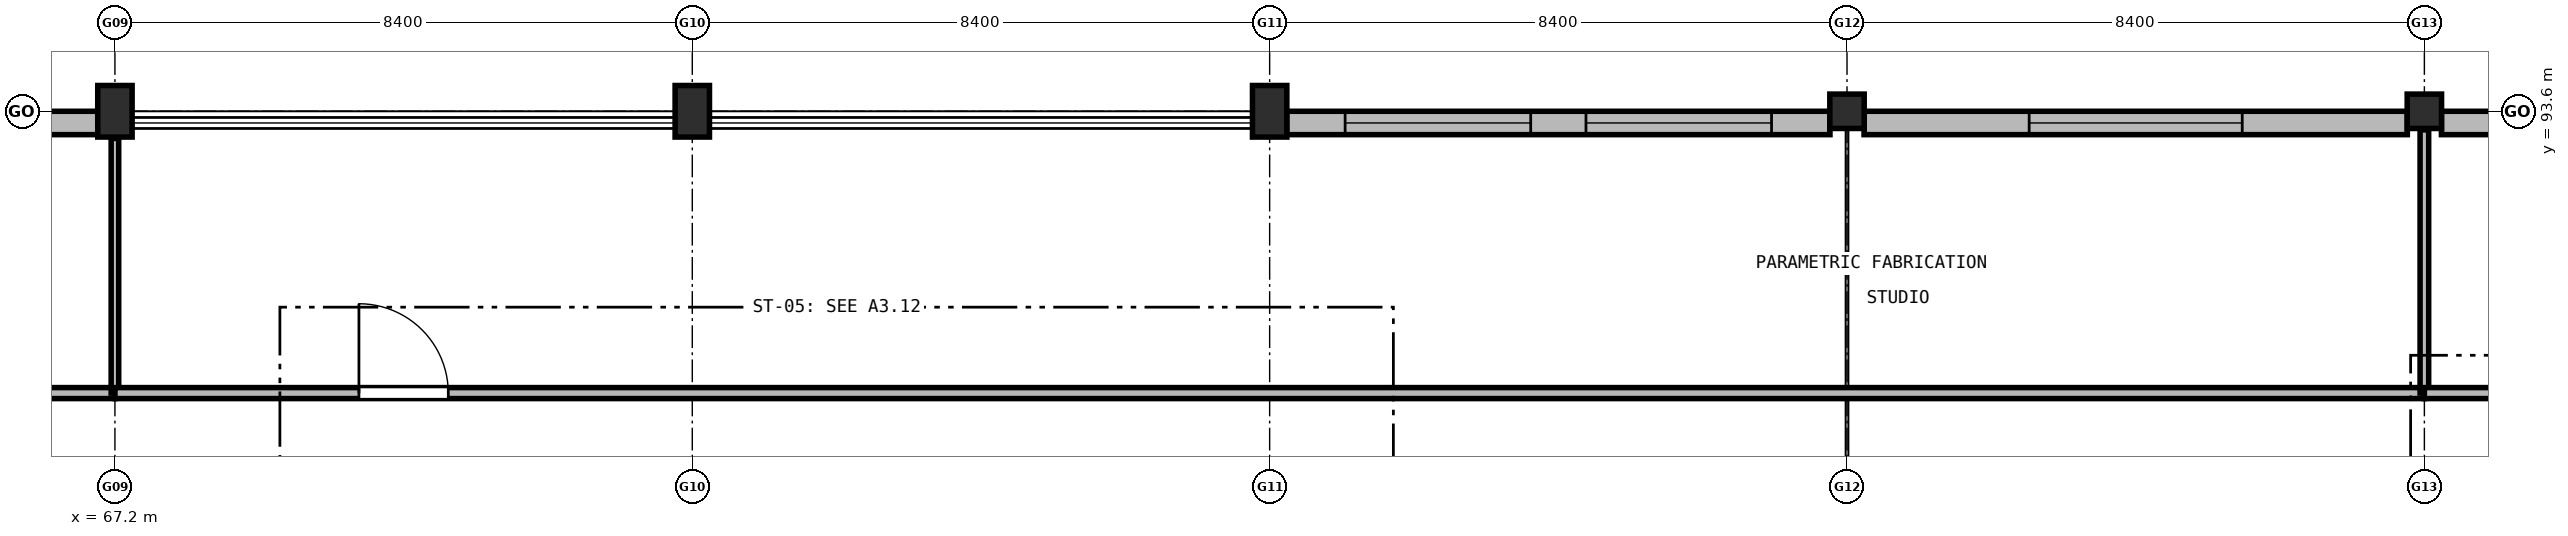
"""IFC4 building model, lengths in metres.
Left out: names, types, materials, properties, quantities, classifications, styles, units other than length and angle.
Written with IfcOpenShell. Run it as: python <this file> out.ifc"""

import sys

from ifc_helpers import new_model, si_unit, direction, frame, frame_2d, origin, origin_2d, place, context, subcontext, project, spatial, rectangle, extrude, element, fill, save


model = new_model("IFC4")
c1 = context("Model", 3, precision=1e-05, world=origin(), true_north=direction((0.0, 1.0)))
c2 = subcontext(c1, "Body", "Model", "MODEL_VIEW")
j1 = project(units=[si_unit("LENGTHUNIT", "METRE"), si_unit("PLANEANGLEUNIT", "RADIAN")], contexts=[c1])
p1 = place(None, origin())
s1 = spatial("IfcSite", under=j1, at=p1, CompositionType="ELEMENT")
p2 = place(p1, origin())
s2 = spatial("IfcBuilding", under=s1, at=p2, CompositionType="ELEMENT")
p3 = place(p2, frame((0.0, 0.0, 9.3)))
s3 = spatial("IfcBuildingStorey", under=s2, at=p3, CompositionType="ELEMENT", Elevation=9.3)
for number, where, z_axis, x_axis in (
    (1, (67.2, 93.6, 0.0), (0.0, 0.0, 1.0), (1.0, 0.0, 0.0)),
    (2, (75.6, 93.6, 0.0), (0.0, 0.0, 1.0), (1.0, 0.0, 0.0)),
    (3, (84.0, 93.6, 0.0), (0.0, 0.0, 1.0), (1.0, 0.0, 0.0)),
):
    element("IfcColumn", number, at=place(p3, frame(where, z_axis=z_axis, x_axis=x_axis)), inside=s3, PredefinedType="COLUMN", context=c2, shape_type="SweptSolid", body=[
        extrude(rectangle(XDim=0.5, YDim=0.75, at=origin_2d()), origin(), (0.0, 0.0, 1.0), 4.2),
    ])
for number, where, z_axis, x_axis in (
    (4, (92.4, 93.6, 0.0), (0.0, 0.0, 1.0), (1.0, 0.0, 0.0)),
    (5, (100.8, 93.6, 0.0), (0.0, 0.0, 1.0), (1.0, 0.0, 0.0)),
):
    element("IfcColumn", number, at=place(p3, frame(where, z_axis=z_axis, x_axis=x_axis)), inside=s3, PredefinedType="COLUMN", context=c2, shape_type="SweptSolid", body=[
        extrude(rectangle(XDim=0.5, YDim=0.5, at=origin_2d()), origin(), (0.0, 0.0, 1.0), 4.2),
    ])
p4 = place(p3, frame((59.048, 93.43, 0.0), z_axis=(0.0, 0.0, 1.0), x_axis=(1.0, 0.0, 0.0)))
e6 = element("IfcWall", 6, at=p4, inside=s3, PredefinedType="SOLIDWALL", context=c2, shape_type="SweptSolid", body=[
    extrude(rectangle(XDim=7.904, YDim=0.34, at=frame_2d((3.952, 0.0))), origin(), (0.0, 0.0, 1.0), 3.18),
])
p5 = place(p4, frame((1.501, 0.0, 0.95)))
e7 = element("IfcOpeningElement", 7, at=p5, cuts=e6, PredefinedType="OPENING", context=c2, shape_type="SweptSolid", body=[
    extrude(rectangle(XDim=1.7, YDim=1.65, at=frame_2d((0.85, 0.825))), frame((0.0, 0.18, 0.0), z_axis=(0.0, -1.0, 0.0), x_axis=(1.0, 0.0, 0.0)), (0.0, 0.0, 1.0), 0.36),
])
p6 = place(p4, frame((4.703, 0.0, 0.95)))
e8 = element("IfcOpeningElement", 8, at=p6, cuts=e6, PredefinedType="OPENING", context=c2, shape_type="SweptSolid", body=[
    extrude(rectangle(XDim=1.7, YDim=1.65, at=frame_2d((0.85, 0.825))), frame((0.0, 0.18, 0.0), z_axis=(0.0, -1.0, 0.0), x_axis=(1.0, 0.0, 0.0)), (0.0, 0.0, 1.0), 0.36),
])
p7 = place(p3, frame((84.248, 93.43, 0.0), z_axis=(0.0, 0.0, 1.0), x_axis=(1.0, 0.0, 0.0)))
e9 = element("IfcWall", 9, at=p7, inside=s3, PredefinedType="SOLIDWALL", context=c2, shape_type="SweptSolid", body=[
    extrude(rectangle(XDim=7.904, YDim=0.34, at=frame_2d((3.952, 0.0))), origin(), (0.0, 0.0, 1.0), 3.18),
])
p8 = place(p7, frame((0.85, 0.0, 0.95)))
e10 = element("IfcOpeningElement", 10, at=p8, cuts=e9, PredefinedType="OPENING", context=c2, shape_type="SweptSolid", body=[
    extrude(rectangle(XDim=2.7, YDim=1.9, at=frame_2d((1.35, 0.95))), frame((0.0, 0.18, 0.0), z_axis=(0.0, -1.0, 0.0), x_axis=(1.0, 0.0, 0.0)), (0.0, 0.0, 1.0), 0.36),
])
p9 = place(p7, frame((4.354, 0.0, 0.95)))
e11 = element("IfcOpeningElement", 11, at=p9, cuts=e9, PredefinedType="OPENING", context=c2, shape_type="SweptSolid", body=[
    extrude(rectangle(XDim=2.7, YDim=1.9, at=frame_2d((1.35, 0.95))), frame((0.0, 0.18, 0.0), z_axis=(0.0, -1.0, 0.0), x_axis=(1.0, 0.0, 0.0)), (0.0, 0.0, 1.0), 0.36),
])
p10 = place(p3, frame((92.648, 93.43, 0.0), z_axis=(0.0, 0.0, 1.0), x_axis=(1.0, 0.0, 0.0)))
e12 = element("IfcWall", 12, at=p10, inside=s3, PredefinedType="SOLIDWALL", context=c2, shape_type="SweptSolid", body=[
    extrude(rectangle(XDim=7.904, YDim=0.34, at=frame_2d((3.952, 0.0))), origin(), (0.0, 0.0, 1.0), 3.18),
])
p11 = place(p10, frame((2.402, 0.0, 0.95)))
e13 = element("IfcOpeningElement", 13, at=p11, cuts=e12, PredefinedType="OPENING", context=c2, shape_type="SweptSolid", body=[
    extrude(rectangle(XDim=3.1, YDim=1.95, at=frame_2d((1.55, 0.975))), frame((0.0, 0.18, 0.0), z_axis=(0.0, -1.0, 0.0), x_axis=(1.0, 0.0, 0.0)), (0.0, 0.0, 1.0), 0.36),
])
p12 = place(p3, frame((101.048, 93.43, 0.0), z_axis=(0.0, 0.0, 1.0), x_axis=(1.0, 0.0, 0.0)))
e14 = element("IfcWall", 14, at=p12, inside=s3, PredefinedType="SOLIDWALL", context=c2, shape_type="SweptSolid", body=[
    extrude(rectangle(XDim=7.904, YDim=0.34, at=frame_2d((3.952, 0.0))), origin(), (0.0, 0.0, 1.0), 3.18),
])
p13 = place(p12, frame((2.302, 0.0, 0.95)))
e15 = element("IfcOpeningElement", 15, at=p13, cuts=e14, PredefinedType="OPENING", context=c2, shape_type="SweptSolid", body=[
    extrude(rectangle(XDim=3.3, YDim=1.65, at=frame_2d((1.65, 0.825))), frame((0.0, 0.18, 0.0), z_axis=(0.0, -1.0, 0.0), x_axis=(1.0, 0.0, 0.0)), (0.0, 0.0, 1.0), 0.36),
])
p14 = place(p3, frame((33.6, 89.5, 0.0), z_axis=(0.0, 0.0, 1.0), x_axis=(1.0, 0.0, 0.0)))
e16 = element("IfcWall", 16, at=p14, inside=s3, PredefinedType="PARTITIONING", context=c2, shape_type="SweptSolid", body=[
    extrude(rectangle(XDim=33.6, YDim=0.16, at=frame_2d((16.8, 0.0))), origin(), (0.0, 0.0, 1.0), 3.325),
])
p15 = place(p14, frame((3.375, 0.0, 0.0)))
e17 = element("IfcOpeningElement", 17, at=p15, cuts=e16, PredefinedType="OPENING", context=c2, shape_type="SweptSolid", body=[
    extrude(rectangle(XDim=1.65, YDim=2.2, at=frame_2d((0.825, 1.1))), frame((0.0, 0.09, 0.0), z_axis=(0.0, -1.0, 0.0), x_axis=(1.0, 0.0, 0.0)), (0.0, 0.0, 1.0), 0.18),
])
p16 = place(p3, frame((67.2, 89.5, 0.0), z_axis=(0.0, 0.0, 1.0), x_axis=(0.0, 1.0, 0.0)))
e18 = element("IfcWall", 18, at=p16, inside=s3, PredefinedType="PARTITIONING", context=c2, shape_type="SweptSolid", body=[
    extrude(rectangle(XDim=3.705, YDim=0.11, at=frame_2d((1.853, 0.0))), origin(), (0.0, 0.0, 1.0), 3.175),
])
p17 = place(p3, frame((67.2, 89.5, 0.0), z_axis=(0.0, 0.0, 1.0), x_axis=(1.0, 0.0, 0.0)))
e19 = element("IfcWall", 19, at=p17, inside=s3, PredefinedType="PARTITIONING", context=c2, shape_type="SweptSolid", body=[
    extrude(rectangle(XDim=33.6, YDim=0.16, at=frame_2d((16.8, 0.0))), origin(), (0.0, 0.0, 1.0), 3.325),
])
p18 = place(p17, frame((3.55, 0.0, 0.0)))
e20 = element("IfcOpeningElement", 20, at=p18, cuts=e19, PredefinedType="OPENING", context=c2, shape_type="SweptSolid", body=[
    extrude(rectangle(XDim=1.3, YDim=2.15, at=frame_2d((0.65, 1.075))), frame((0.0, 0.09, 0.0), z_axis=(0.0, -1.0, 0.0), x_axis=(1.0, 0.0, 0.0)), (0.0, 0.0, 1.0), 0.18),
])
p19 = place(p3, frame((100.8, 89.5, 0.0), z_axis=(0.0, 0.0, 1.0), x_axis=(0.0, 1.0, 0.0)))
e21 = element("IfcWall", 21, at=p19, inside=s3, PredefinedType="PARTITIONING", context=c2, shape_type="SweptSolid", body=[
    extrude(rectangle(XDim=3.83, YDim=0.125, at=frame_2d((1.915, 0.0))), origin(), (0.0, 0.0, 1.0), 3.175),
])
p20 = place(p3, frame((100.8, 89.5, 0.0), z_axis=(0.0, 0.0, 1.0), x_axis=(1.0, 0.0, 0.0)))
e22 = element("IfcWall", 22, at=p20, inside=s3, PredefinedType="PARTITIONING", context=c2, shape_type="SweptSolid", body=[
    extrude(rectangle(XDim=33.38, YDim=0.16, at=frame_2d((16.69, 0.0))), origin(), (0.0, 0.0, 1.0), 3.325),
])
p21 = place(p20, frame((3.675, 0.0, 0.0)))
e23 = element("IfcOpeningElement", 23, at=p21, cuts=e22, PredefinedType="OPENING", context=c2, shape_type="SweptSolid", body=[
    extrude(rectangle(XDim=1.05, YDim=2.15, at=frame_2d((0.525, 1.075))), frame((0.0, 0.09, 0.0), z_axis=(0.0, -1.0, 0.0), x_axis=(1.0, 0.0, 0.0)), (0.0, 0.0, 1.0), 0.18),
])
p22 = place(p8, origin())
e24 = element("IfcWindow", 24, at=p22, inside=s3, PartitioningType="SINGLE_PANEL", PredefinedType="WINDOW", context=c2, shape_type="SweptSolid", body=[
    extrude(rectangle(XDim=2.7, YDim=1.9, at=frame_2d((1.35, 0.95))), frame((0.0, 0.03, 0.0), z_axis=(0.0, -1.0, 0.0), x_axis=(1.0, 0.0, 0.0)), (0.0, 0.0, 1.0), 0.06),
])
fill(e10, e24)
p23 = place(p9, origin())
e25 = element("IfcWindow", 25, at=p23, inside=s3, PartitioningType="SINGLE_PANEL", PredefinedType="WINDOW", context=c2, shape_type="SweptSolid", body=[
    extrude(rectangle(XDim=2.7, YDim=1.9, at=frame_2d((1.35, 0.95))), frame((0.0, 0.03, 0.0), z_axis=(0.0, -1.0, 0.0), x_axis=(1.0, 0.0, 0.0)), (0.0, 0.0, 1.0), 0.06),
])
fill(e11, e25)
p24 = place(p11, origin())
e26 = element("IfcWindow", 26, at=p24, inside=s3, PartitioningType="SINGLE_PANEL", PredefinedType="WINDOW", context=c2, shape_type="SweptSolid", body=[
    extrude(rectangle(XDim=3.1, YDim=1.95, at=frame_2d((1.55, 0.975))), frame((0.0, 0.03, 0.0), z_axis=(0.0, -1.0, 0.0), x_axis=(1.0, 0.0, 0.0)), (0.0, 0.0, 1.0), 0.06),
])
fill(e13, e26)
p25 = place(p18, origin())
e27 = element("IfcDoor", 27, at=p25, inside=s3, OperationType="SINGLE_SWING_LEFT", PredefinedType="DOOR", context=c2, shape_type="SweptSolid", body=[
    extrude(rectangle(XDim=1.3, YDim=2.15, at=frame_2d((0.65, 1.075))), frame((0.0, 0.025, 0.0), z_axis=(0.0, -1.0, 0.0), x_axis=(1.0, 0.0, 0.0)), (0.0, 0.0, 1.0), 0.05),
])
fill(e20, e27)
save(model, sys.argv[1])
